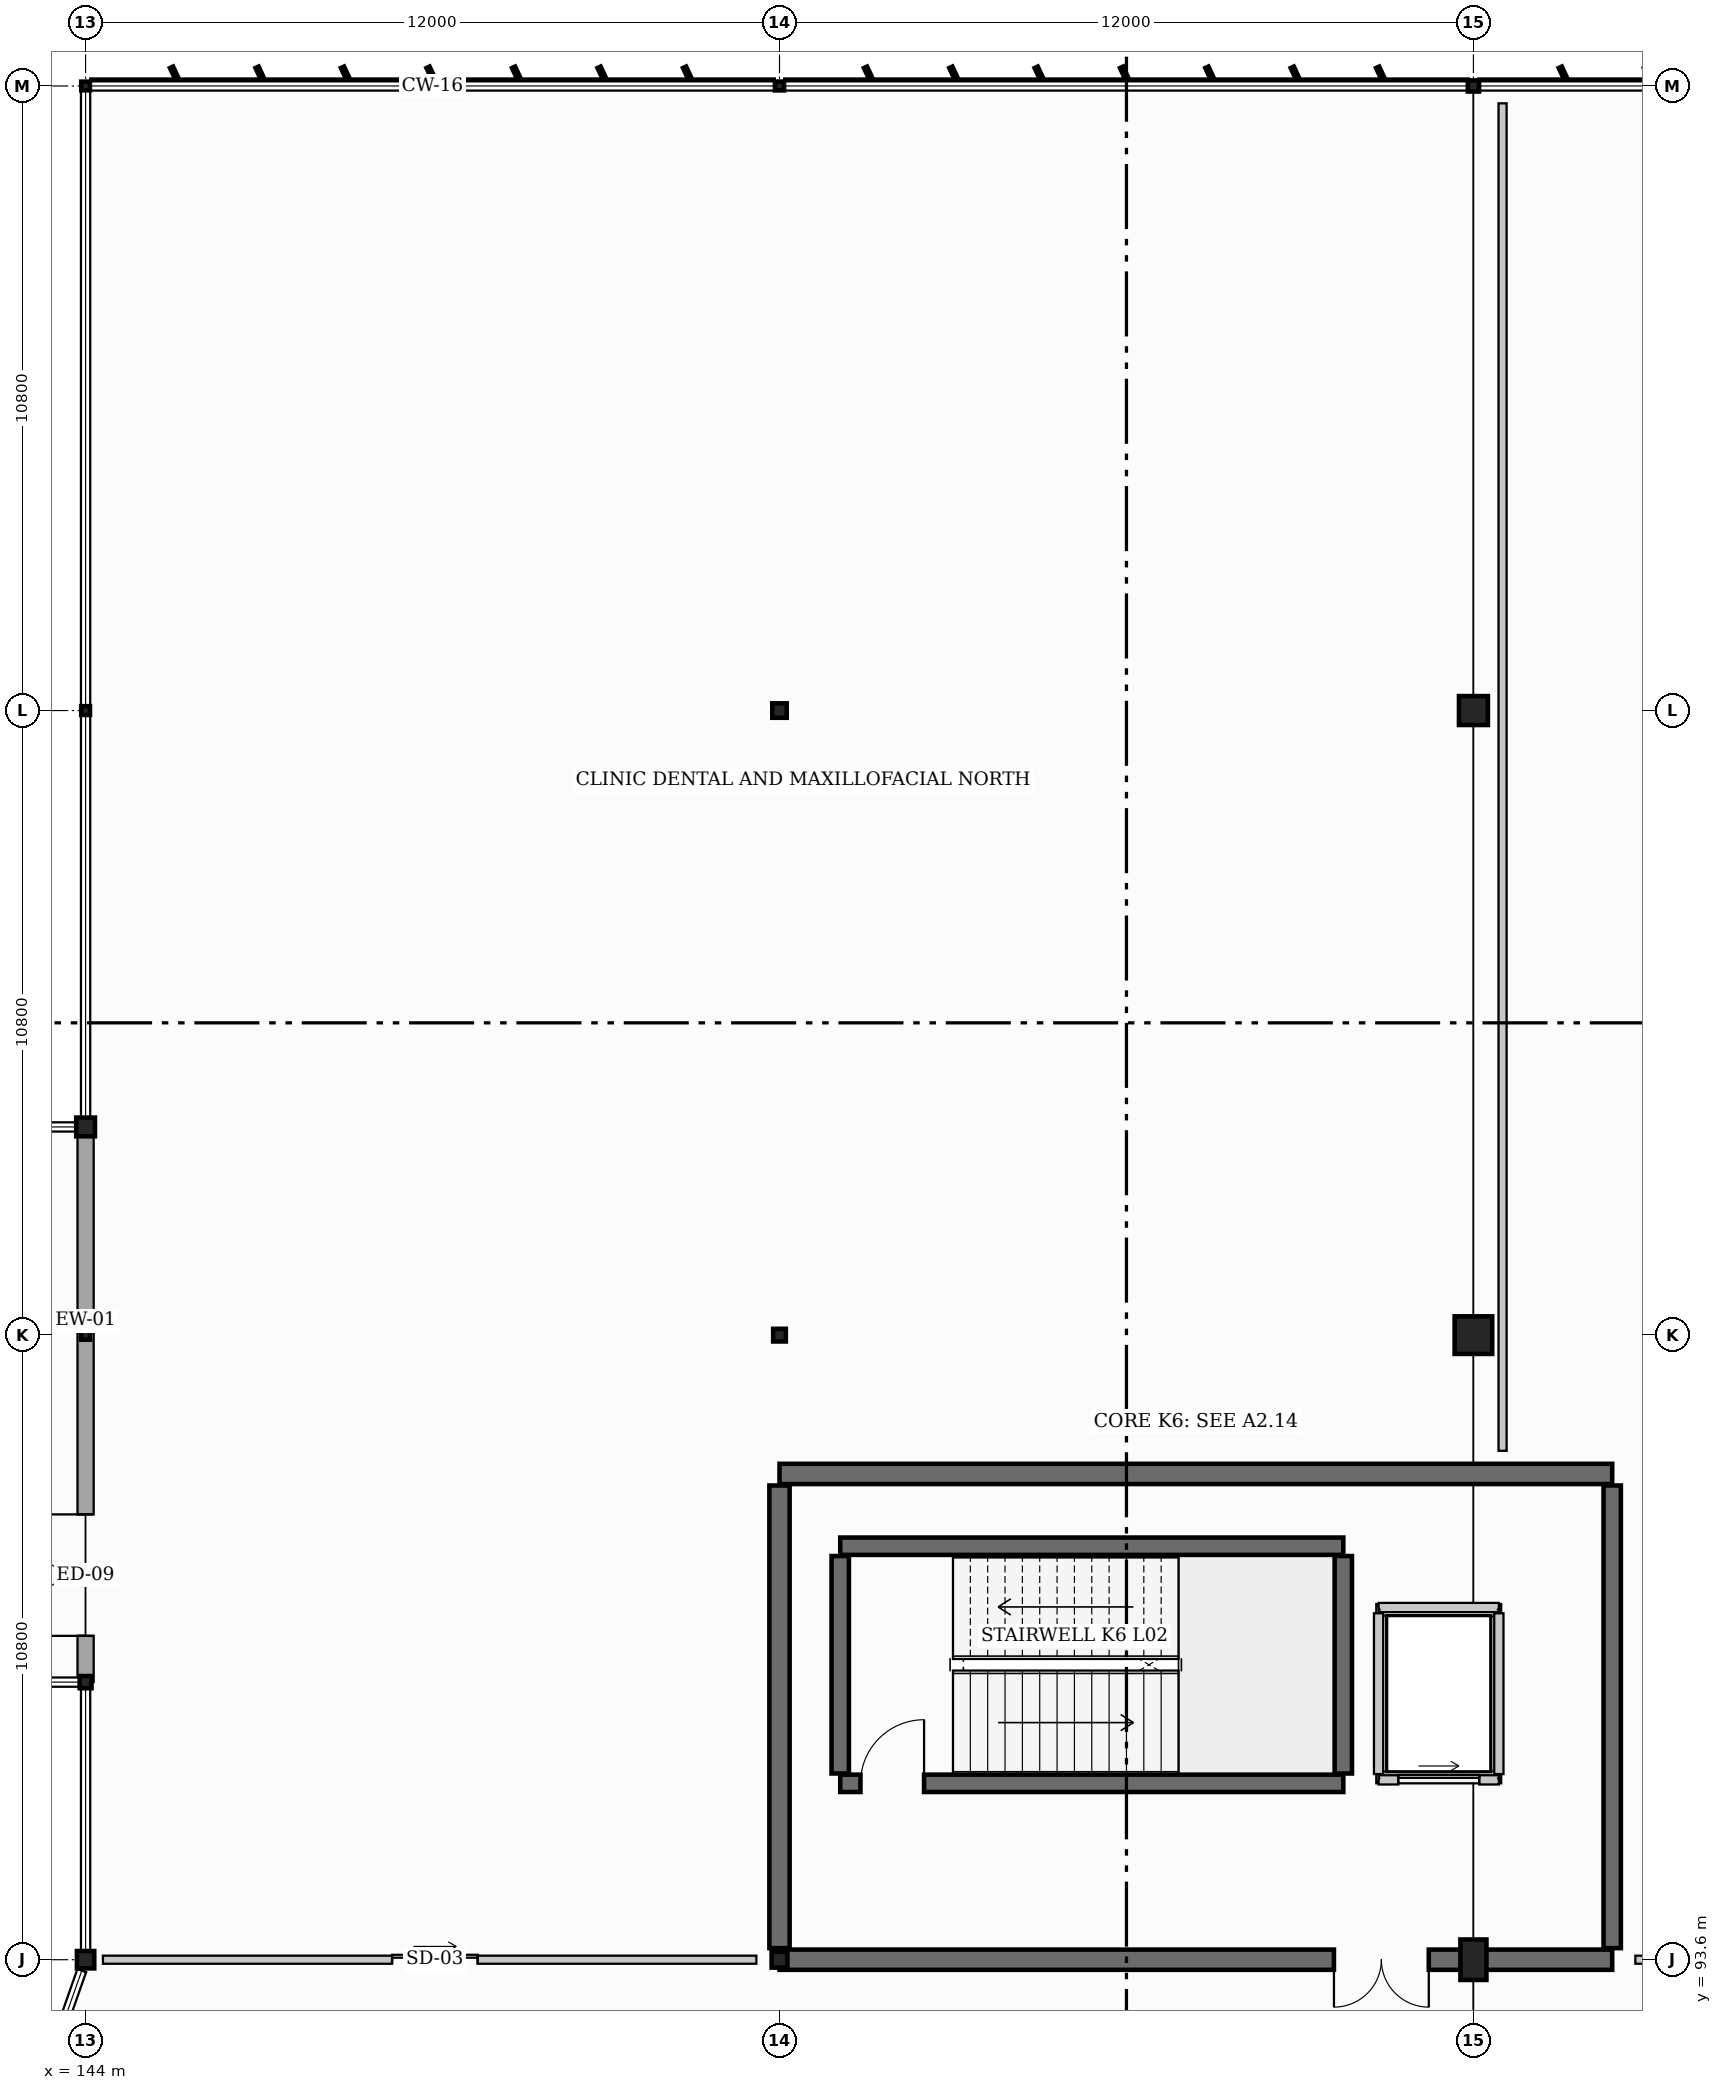
"""IFC4 building model, lengths in metres.
Left out: names, types, materials, properties, quantities, classifications, styles, units other than length and angle.
Written with IfcOpenShell. Run it as: python <this file> out.ifc"""

import sys

from ifc_helpers import new_model, si_unit, direction, frame, frame_2d, origin, origin_2d, place, context, subcontext, project, spatial, rectangle, hollow_rectangle, hollow_circle, i_section, extrude, element, fill, save


model = new_model("IFC4")
c1 = context("Model", 3, precision=1e-05, world=origin(), true_north=direction((0.0, 1.0)))
c2 = subcontext(c1, "Body", "Model", "MODEL_VIEW")
j1 = project(units=[si_unit("LENGTHUNIT", "METRE"), si_unit("PLANEANGLEUNIT", "RADIAN")], contexts=[c1])
p1 = place(None, origin())
s1 = spatial("IfcSite", under=j1, at=p1, CompositionType="ELEMENT")
p2 = place(p1, origin())
s2 = spatial("IfcBuilding", under=s1, at=p2, CompositionType="ELEMENT")
p3 = place(p2, frame((0.0, 0.0, 9.6)))
s3 = spatial("IfcBuildingStorey", under=s2, at=p3, CompositionType="ELEMENT", Elevation=9.6)
p4 = place(p3, frame((144.0, 93.6, 0.0), z_axis=(0.0, 0.0, 1.0), x_axis=(1.0, 0.0, 0.0)))
e1 = element("IfcColumn", 1, at=p4, inside=s3, PredefinedType="COLUMN", context=c2, shape_type="SweptSolid", body=[
    extrude(hollow_rectangle(XDim=0.3, YDim=0.3, WallThickness=0.012, at=origin_2d()), origin(), (0.0, 0.0, 1.0), 4.8),
])
p5 = place(p3, frame((144.0, 104.4, 0.0), z_axis=(0.0, 0.0, 1.0), x_axis=(1.0, 0.0, 0.0)))
e2 = element("IfcColumn", 2, at=p5, inside=s3, PredefinedType="COLUMN", context=c2, shape_type="SweptSolid", body=[
    extrude(i_section(OverallWidth=0.153, OverallDepth=0.158, WebThickness=0.007, FlangeThickness=0.01, at=origin_2d()), origin(), (0.0, 0.0, 1.0), 4.8),
])
p6 = place(p3, frame((144.0, 115.2, 0.0), z_axis=(0.0, 0.0, 1.0), x_axis=(1.0, 0.0, 0.0)))
e3 = element("IfcColumn", 3, at=p6, inside=s3, PredefinedType="COLUMN", context=c2, shape_type="SweptSolid", body=[
    extrude(i_section(OverallWidth=0.152, OverallDepth=0.152, WebThickness=0.006, FlangeThickness=0.007, at=origin_2d()), origin(), (0.0, 0.0, 1.0), 4.8),
])
p7 = place(p3, frame((144.0, 126.0, 0.0), z_axis=(0.0, 0.0, 1.0), x_axis=(1.0, 0.0, 0.0)))
e4 = element("IfcColumn", 4, at=p7, inside=s3, PredefinedType="COLUMN", context=c2, shape_type="SweptSolid", body=[
    extrude(hollow_rectangle(XDim=0.15, YDim=0.15, WallThickness=0.008, at=origin_2d()), origin(), (0.0, 0.0, 1.0), 4.8),
])
p8 = place(p3, frame((156.0, 93.6, 0.0), z_axis=(0.0, 0.0, 1.0), x_axis=(0.0, 1.0, 0.0)))
e5 = element("IfcColumn", 5, at=p8, inside=s3, PredefinedType="COLUMN", context=c2, shape_type="SweptSolid", body=[
    extrude(hollow_circle(Radius=0.136, WallThickness=0.013, at=origin_2d()), origin(), (0.0, 0.0, 1.0), 4.8),
])
p9 = place(p3, frame((156.0, 104.4, 0.0), z_axis=(0.0, 0.0, 1.0), x_axis=(0.0, 1.0, 0.0)))
e6 = element("IfcColumn", 6, at=p9, inside=s3, PredefinedType="COLUMN", context=c2, shape_type="SweptSolid", body=[
    extrude(hollow_circle(Radius=0.11, WallThickness=0.01, at=origin_2d()), origin(), (0.0, 0.0, 1.0), 4.8),
])
p10 = place(p3, frame((156.0, 115.2, 0.0), z_axis=(0.0, 0.0, 1.0), x_axis=(0.0, 1.0, 0.0)))
e7 = element("IfcColumn", 7, at=p10, inside=s3, PredefinedType="COLUMN", context=c2, shape_type="SweptSolid", body=[
    extrude(hollow_rectangle(XDim=0.25, YDim=0.25, WallThickness=0.012, at=origin_2d()), origin(), (0.0, 0.0, 1.0), 4.8),
])
p11 = place(p3, frame((156.0, 126.0, 0.0), z_axis=(0.0, 0.0, 1.0), x_axis=(0.0, 1.0, 0.0)))
e8 = element("IfcColumn", 8, at=p11, inside=s3, PredefinedType="COLUMN", context=c2, shape_type="SweptSolid", body=[
    extrude(i_section(OverallWidth=0.153, OverallDepth=0.158, WebThickness=0.007, FlangeThickness=0.01, at=origin_2d()), origin(), (0.0, 0.0, 1.0), 4.8),
])
p12 = place(p3, frame((168.0, 93.6, 0.0), z_axis=(0.0, 0.0, 1.0), x_axis=(1.0, 0.0, 0.0)))
e9 = element("IfcColumn", 9, at=p12, inside=s3, PredefinedType="PILASTER", context=c2, shape_type="SweptSolid", body=[
    extrude(rectangle(XDim=0.45, YDim=0.7, at=origin_2d()), origin(), (0.0, 0.0, 1.0), 4.8),
])
p13 = place(p3, frame((168.0, 104.4, 0.0), z_axis=(0.0, 0.0, 1.0), x_axis=(1.0, 0.0, 0.0)))
e10 = element("IfcColumn", 10, at=p13, inside=s3, PredefinedType="COLUMN", context=c2, shape_type="SweptSolid", body=[
    extrude(rectangle(XDim=0.65, YDim=0.65, at=origin_2d()), origin(), (0.0, 0.0, 1.0), 4.8),
])
p14 = place(p3, frame((168.0, 115.2, 0.0), z_axis=(0.0, 0.0, 1.0), x_axis=(1.0, 0.0, 0.0)))
e11 = element("IfcColumn", 11, at=p14, inside=s3, PredefinedType="COLUMN", context=c2, shape_type="SweptSolid", body=[
    extrude(i_section(OverallWidth=0.5, OverallDepth=0.5, WebThickness=0.022, FlangeThickness=0.036, at=origin_2d()), origin(), (0.0, 0.0, 1.0), 4.8),
])
p15 = place(p3, frame((168.0, 126.0, 0.0), z_axis=(0.0, 0.0, 1.0), x_axis=(1.0, 0.0, 0.0)))
e12 = element("IfcColumn", 12, at=p15, inside=s3, PredefinedType="COLUMN", context=c2, shape_type="SweptSolid", body=[
    extrude(hollow_circle(Radius=0.097, WallThickness=0.008, at=origin_2d()), origin(), (0.0, 0.0, 1.0), 4.8),
])
p16 = place(p3, frame((144.0, 98.4, 0.0), z_axis=(0.0, 0.0, 1.0), x_axis=(1.0, 0.0, 0.0)))
e13 = element("IfcColumn", 13, at=p16, inside=s3, PredefinedType="COLUMN", context=c2, shape_type="SweptSolid", body=[
    extrude(i_section(OverallWidth=0.205, OverallDepth=0.21, WebThickness=0.009, FlangeThickness=0.014, at=origin_2d()), origin(), (0.0, 0.0, 1.0), 4.8),
])
p17 = place(p3, frame((144.0, 108.0, 0.0), z_axis=(0.0, 0.0, 1.0), x_axis=(1.0, 0.0, 0.0)))
e14 = element("IfcColumn", 14, at=p17, inside=s3, PredefinedType="COLUMN", context=c2, shape_type="SweptSolid", body=[
    extrude(hollow_circle(Radius=0.162, WallThickness=0.013, at=origin_2d()), origin(), (0.0, 0.0, 1.0), 4.8),
])
p18 = place(p3, frame((156.0, 102.0, 0.0), z_axis=(0.0, 0.0, 1.0), x_axis=(1.0, 0.0, 0.0)))
e15 = element("IfcWall", 15, at=p18, inside=s3, PredefinedType="SHEAR", context=c2, shape_type="SweptSolid", body=[
    extrude(rectangle(XDim=14.4, YDim=0.35, at=frame_2d((7.2, 0.0))), origin(), (0.0, 0.0, 1.0), 4.8),
])
p19 = place(p3, frame((170.4, 93.6, 0.0), z_axis=(0.0, 0.0, 1.0), x_axis=(-1.0, 0.0, 0.0)))
e16 = element("IfcWall", 16, at=p19, inside=s3, PredefinedType="SHEAR", context=c2, shape_type="SweptSolid", body=[
    extrude(rectangle(XDim=14.4, YDim=0.35, at=frame_2d((7.2, 0.0))), origin(), (0.0, 0.0, 1.0), 4.8),
])
p20 = place(p19, frame((3.172, 0.0, 0.0)))
e17 = element("IfcOpeningElement", 17, at=p20, cuts=e16, PredefinedType="OPENING", context=c2, shape_type="SweptSolid", body=[
    extrude(rectangle(XDim=1.64, YDim=2.2, at=frame_2d((0.82, 1.1))), frame((0.0, 0.185, 0.0), z_axis=(0.0, -1.0, 0.0), x_axis=(1.0, 0.0, 0.0)), (0.0, 0.0, 1.0), 0.37),
])
p21 = place(p3, frame((156.0, 93.8, 0.0), z_axis=(0.0, 0.0, 1.0), x_axis=(0.0, 1.0, 0.0)))
e18 = element("IfcWall", 18, at=p21, inside=s3, PredefinedType="SHEAR", context=c2, shape_type="SweptSolid", body=[
    extrude(rectangle(XDim=8.0, YDim=0.35, at=frame_2d((4.0, 0.0))), origin(), (0.0, 0.0, 1.0), 4.8),
])
p22 = place(p3, frame((170.4, 101.8, 0.0), z_axis=(0.0, 0.0, 1.0), x_axis=(0.0, -1.0, 0.0)))
e19 = element("IfcWall", 19, at=p22, inside=s3, PredefinedType="SHEAR", context=c2, shape_type="SweptSolid", body=[
    extrude(rectangle(XDim=8.0, YDim=0.3, at=frame_2d((4.0, 0.0))), origin(), (0.0, 0.0, 1.0), 4.8),
])
p23 = place(p3, frame((157.05, 96.65, 0.0), z_axis=(0.0, 0.0, 1.0), x_axis=(1.0, 0.0, 0.0)))
e20 = element("IfcWall", 20, at=p23, inside=s3, PredefinedType="SHEAR", context=c2, shape_type="SweptSolid", body=[
    extrude(rectangle(XDim=8.7, YDim=0.3, at=frame_2d((4.35, 0.0))), origin(), (0.0, 0.0, 1.0), 4.8),
])
p24 = place(p23, frame((0.35, 0.0, 0.0)))
e21 = element("IfcOpeningElement", 21, at=p24, cuts=e20, PredefinedType="OPENING", context=c2, shape_type="SweptSolid", body=[
    extrude(rectangle(XDim=1.1, YDim=2.15, at=frame_2d((0.55, 1.075))), frame((0.0, 0.16, 0.0), z_axis=(0.0, -1.0, 0.0), x_axis=(1.0, 0.0, 0.0)), (0.0, 0.0, 1.0), 0.32),
])
p25 = place(p3, frame((165.75, 100.75, 0.0), z_axis=(0.0, 0.0, 1.0), x_axis=(-1.0, 0.0, 0.0)))
e22 = element("IfcWall", 22, at=p25, inside=s3, PredefinedType="SHEAR", context=c2, shape_type="SweptSolid", body=[
    extrude(rectangle(XDim=8.7, YDim=0.3, at=frame_2d((4.35, 0.0))), origin(), (0.0, 0.0, 1.0), 4.8),
])
for number, where, z_axis, x_axis in (
    (23, (157.05, 96.82, 0.0), (0.0, 0.0, 1.0), (0.0, 1.0, 0.0)),
    (24, (165.75, 96.82, 0.0), (0.0, 0.0, 1.0), (0.0, 1.0, 0.0)),
):
    element("IfcWall", number, at=place(p3, frame(where, z_axis=z_axis, x_axis=x_axis)), inside=s3, PredefinedType="SHEAR", context=c2, shape_type="SweptSolid", body=[
        extrude(rectangle(XDim=3.76, YDim=0.3, at=frame_2d((1.88, 0.0))), origin(), (0.0, 0.0, 1.0), 4.8),
    ])
p26 = place(p3, frame((144.0, 98.4, 0.0), z_axis=(0.0, 0.0, 1.0), x_axis=(0.0, 1.0, 0.0)))
e25 = element("IfcWall", 25, at=p26, inside=s3, PredefinedType="STANDARD", context=c2, shape_type="SweptSolid", body=[
    extrude(rectangle(XDim=9.6, YDim=0.28, at=frame_2d((4.8, 0.0))), origin(), (0.0, 0.0, 1.0), 3.48),
])
p27 = place(p26, frame((0.8, 0.0, 0.0)))
e26 = element("IfcOpeningElement", 26, at=p27, cuts=e25, PredefinedType="OPENING", context=c2, shape_type="SweptSolid", body=[
    extrude(rectangle(XDim=2.1, YDim=2.25, at=frame_2d((1.05, 1.125))), frame((0.0, 0.15, 0.0), z_axis=(0.0, -1.0, 0.0), x_axis=(1.0, 0.0, 0.0)), (0.0, 0.0, 1.0), 0.3),
])
p28 = place(p3, frame((166.36, 96.71, 0.0), z_axis=(0.0, 0.0, 1.0), x_axis=(1.0, 0.0, 0.0)))
e27 = element("IfcWall", 27, at=p28, inside=s3, PredefinedType="PARTITIONING", context=c2, shape_type="SweptSolid", body=[
    extrude(rectangle(XDim=2.08, YDim=0.16, at=frame_2d((1.04, 0.0))), origin(), (0.0, 0.0, 1.0), 4.43),
])
p29 = place(p28, frame((0.34, 0.0, 0.0)))
e28 = element("IfcOpeningElement", 28, at=p29, cuts=e27, PredefinedType="OPENING", context=c2, shape_type="SweptSolid", body=[
    extrude(rectangle(XDim=1.4, YDim=2.2, at=frame_2d((0.7, 1.1))), frame((0.0, 0.09, 0.0), z_axis=(0.0, -1.0, 0.0), x_axis=(1.0, 0.0, 0.0)), (0.0, 0.0, 1.0), 0.18),
])
p30 = place(p3, frame((168.44, 99.69, 0.0), z_axis=(0.0, 0.0, 1.0), x_axis=(-1.0, 0.0, 0.0)))
e29 = element("IfcWall", 29, at=p30, inside=s3, PredefinedType="PARTITIONING", context=c2, shape_type="SweptSolid", body=[
    extrude(rectangle(XDim=2.08, YDim=0.16, at=frame_2d((1.04, 0.0))), origin(), (0.0, 0.0, 1.0), 4.43),
])
for number, where, z_axis, x_axis in (
    (30, (166.36, 99.59, 0.0), (0.0, 0.0, 1.0), (0.0, -1.0, 0.0)),
    (31, (168.44, 96.81, 0.0), (0.0, 0.0, 1.0), (0.0, 1.0, 0.0)),
):
    element("IfcWall", number, at=place(p3, frame(where, z_axis=z_axis, x_axis=x_axis)), inside=s3, PredefinedType="PARTITIONING", context=c2, shape_type="SweptSolid", body=[
        extrude(rectangle(XDim=2.78, YDim=0.16, at=frame_2d((1.39, 0.0))), origin(), (0.0, 0.0, 1.0), 4.43),
    ])
p31 = place(p3, frame((144.3, 93.6, 0.0), z_axis=(0.0, 0.0, 1.0), x_axis=(1.0, 0.0, 0.0)))
e32 = element("IfcWall", 32, at=p31, inside=s3, PredefinedType="PARTITIONING", context=c2, shape_type="SweptSolid", body=[
    extrude(rectangle(XDim=11.3, YDim=0.14, at=frame_2d((5.65, 0.0))), origin(), (0.0, 0.0, 1.0), 3.897),
])
p32 = place(p31, frame((5.0, 0.0, 0.0)))
e33 = element("IfcOpeningElement", 33, at=p32, cuts=e32, PredefinedType="OPENING", context=c2, shape_type="SweptSolid", body=[
    extrude(rectangle(XDim=1.48, YDim=2.26, at=frame_2d((0.74, 1.13))), frame((0.0, 0.08, 0.0), z_axis=(0.0, -1.0, 0.0), x_axis=(1.0, 0.0, 0.0)), (0.0, 0.0, 1.0), 0.16),
])
p33 = place(p3, frame((168.504, 102.4, 0.0), z_axis=(0.0, 0.0, 1.0), x_axis=(0.0, 1.0, 0.0)))
e34 = element("IfcWall", 34, at=p33, inside=s3, PredefinedType="PARTITIONING", context=c2, shape_type="SweptSolid", body=[
    extrude(rectangle(XDim=23.3, YDim=0.14, at=frame_2d((11.65, 0.0))), origin(), (0.0, 0.0, 1.0), 3.475),
])
p34 = place(p3, frame((170.8, 93.6, 0.0), z_axis=(0.0, 0.0, 1.0), x_axis=(1.0, 0.0, 0.0)))
e35 = element("IfcWall", 35, at=p34, inside=s3, PredefinedType="PARTITIONING", context=c2, shape_type="SweptSolid", body=[
    extrude(rectangle(XDim=14.849, YDim=0.14, at=frame_2d((7.424, 0.0))), origin(), (0.0, 0.0, 1.0), 3.525),
])
p35 = place(p34, frame((6.774, 0.0, 0.0)))
e36 = element("IfcOpeningElement", 36, at=p35, cuts=e35, PredefinedType="OPENING", context=c2, shape_type="SweptSolid", body=[
    extrude(rectangle(XDim=1.36, YDim=2.18, at=frame_2d((0.68, 1.09))), frame((0.0, 0.08, 0.0), z_axis=(0.0, -1.0, 0.0), x_axis=(1.0, 0.0, 0.0)), (0.0, 0.0, 1.0), 0.16),
])
p36 = place(p27, origin())
e37 = element("IfcDoor", 37, at=p36, inside=s3, OperationType="DOUBLE_DOOR_SINGLE_SWING", PredefinedType="DOOR", context=c2, shape_type="SweptSolid", body=[
    extrude(rectangle(XDim=2.1, YDim=2.25, at=frame_2d((1.05, 1.125))), frame((0.0, 0.025, 0.0), z_axis=(0.0, -1.0, 0.0), x_axis=(1.0, 0.0, 0.0)), (0.0, 0.0, 1.0), 0.05),
])
fill(e26, e37)
p37 = place(p29, origin())
e38 = element("IfcDoor", 38, at=p37, inside=s3, OperationType="SLIDING_TO_LEFT", PredefinedType="DOOR", context=c2, shape_type="SweptSolid", body=[
    extrude(rectangle(XDim=1.4, YDim=2.2, at=frame_2d((0.7, 1.1))), frame((0.0, 0.025, 0.0), z_axis=(0.0, -1.0, 0.0), x_axis=(1.0, 0.0, 0.0)), (0.0, 0.0, 1.0), 0.05),
])
fill(e28, e38)
p38 = place(p24, origin())
e39 = element("IfcDoor", 39, at=p38, inside=s3, OperationType="SINGLE_SWING_RIGHT", PredefinedType="DOOR", context=c2, shape_type="SweptSolid", body=[
    extrude(rectangle(XDim=1.1, YDim=2.15, at=frame_2d((0.55, 1.075))), frame((0.0, 0.025, 0.0), z_axis=(0.0, -1.0, 0.0), x_axis=(1.0, 0.0, 0.0)), (0.0, 0.0, 1.0), 0.05),
])
fill(e21, e39)
p39 = place(p20, origin())
e40 = element("IfcDoor", 40, at=p39, inside=s3, OperationType="DOUBLE_DOOR_SINGLE_SWING", PredefinedType="DOOR", context=c2, shape_type="SweptSolid", body=[
    extrude(rectangle(XDim=1.64, YDim=2.2, at=frame_2d((0.82, 1.1))), frame((0.0, 0.025, 0.0), z_axis=(0.0, -1.0, 0.0), x_axis=(1.0, 0.0, 0.0)), (0.0, 0.0, 1.0), 0.05),
])
fill(e17, e40)
p40 = place(p32, origin())
e41 = element("IfcDoor", 41, at=p40, inside=s3, OperationType="SLIDING_TO_LEFT", PredefinedType="DOOR", context=c2, shape_type="SweptSolid", body=[
    extrude(rectangle(XDim=1.48, YDim=2.26, at=frame_2d((0.74, 1.13))), frame((0.0, 0.025, 0.0), z_axis=(0.0, -1.0, 0.0), x_axis=(1.0, 0.0, 0.0)), (0.0, 0.0, 1.0), 0.05),
])
fill(e33, e41)
save(model, sys.argv[1])
